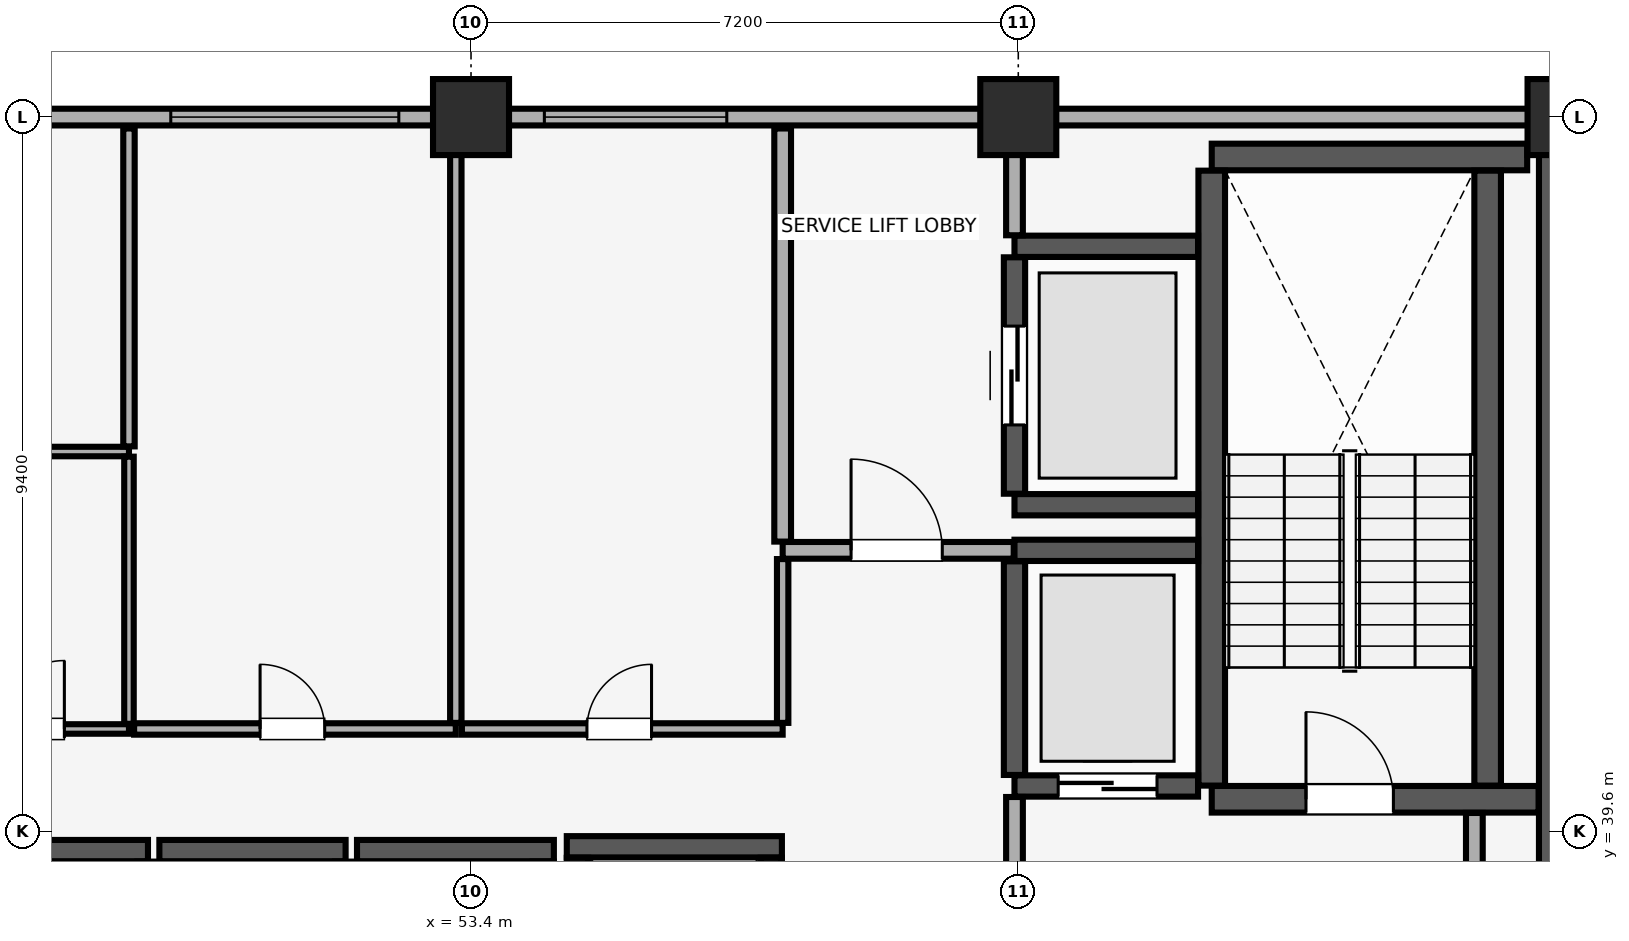
"""IFC4 building model, lengths in metres.
Left out: names, types, materials, properties, quantities, classifications, styles, units other than length and angle.
Written with IfcOpenShell. Run it as: python <this file> out.ifc"""

import sys

from ifc_helpers import new_model, si_unit, direction, frame, frame_2d, origin, origin_2d, place, context, subcontext, project, spatial, rectangle, extrude, element, fill, save


model = new_model("IFC4")
c1 = context("Model", 3, precision=1e-05, world=origin(), true_north=direction((0.0, 1.0)))
c2 = subcontext(c1, "Body", "Model", "MODEL_VIEW")
j1 = project(units=[si_unit("LENGTHUNIT", "METRE"), si_unit("PLANEANGLEUNIT", "RADIAN")], contexts=[c1])
p1 = place(None, origin())
s1 = spatial("IfcSite", under=j1, at=p1, CompositionType="ELEMENT")
p2 = place(p1, origin())
s2 = spatial("IfcBuilding", under=s1, at=p2, CompositionType="ELEMENT")
p3 = place(p2, frame((0.0, 0.0, 229.15)))
s3 = spatial("IfcBuildingStorey", under=s2, at=p3, CompositionType="ELEMENT", Elevation=229.15)
for number, where, z_axis, x_axis in (
    (1, (53.4, 49.0, 0.0), (0.0, 0.0, 1.0), (1.0, 0.0, 0.0)),
    (2, (60.6, 49.0, 0.0), (0.0, 0.0, 1.0), (1.0, 0.0, 0.0)),
    (3, (67.8, 49.0, 0.0), (0.0, 0.0, 1.0), (1.0, 0.0, 0.0)),
):
    element("IfcColumn", number, at=place(p3, frame(where, z_axis=z_axis, x_axis=x_axis)), inside=s3, PredefinedType="COLUMN", context=c2, shape_type="SweptSolid", body=[
        extrude(rectangle(XDim=1.0, YDim=1.0, at=origin_2d()), origin(), (0.0, 0.0, 1.0), 3.71),
    ])
p4 = place(p3, frame((74.2, 49.0, 0.0), z_axis=(0.0, 0.0, 1.0), x_axis=(-1.0, 0.0, 0.0)))
e4 = element("IfcWall", 4, at=p4, inside=s3, PredefinedType="SOLIDWALL", context=c2, shape_type="SweptSolid", body=[
    extrude(rectangle(XDim=64.4, YDim=0.22, at=frame_2d((32.2, 0.0))), origin(), (0.0, 0.0, 1.0), 2.91),
])
p5 = place(p4, frame((59.815, 0.0, 0.85)))
e5 = element("IfcOpeningElement", 5, at=p5, cuts=e4, PredefinedType="OPENING", context=c2, shape_type="SweptSolid", body=[
    extrude(rectangle(XDim=3.0, YDim=1.5, at=frame_2d((1.5, 0.75))), frame((0.0, 0.12, 0.0), z_axis=(0.0, -1.0, 0.0), x_axis=(1.0, 0.0, 0.0)), (0.0, 0.0, 1.0), 0.24),
])
p6 = place(p4, frame((1.585, 0.0, 0.85)))
e6 = element("IfcOpeningElement", 6, at=p6, cuts=e4, PredefinedType="OPENING", context=c2, shape_type="SweptSolid", body=[
    extrude(rectangle(XDim=3.0, YDim=1.5, at=frame_2d((1.5, 0.75))), frame((0.0, 0.12, 0.0), z_axis=(0.0, -1.0, 0.0), x_axis=(1.0, 0.0, 0.0)), (0.0, 0.0, 1.0), 0.24),
])
p7 = place(p4, frame((44.715, 0.0, 0.9)))
e7 = element("IfcOpeningElement", 7, at=p7, cuts=e4, PredefinedType="OPENING", context=c2, shape_type="SweptSolid", body=[
    extrude(rectangle(XDim=3.6, YDim=1.5, at=frame_2d((1.8, 0.75))), frame((0.0, 0.12, 0.0), z_axis=(0.0, -1.0, 0.0), x_axis=(1.0, 0.0, 0.0)), (0.0, 0.0, 1.0), 0.24),
])
p8 = place(p4, frame((38.5, 0.0, 0.9)))
e8 = element("IfcOpeningElement", 8, at=p8, cuts=e4, PredefinedType="OPENING", context=c2, shape_type="SweptSolid", body=[
    extrude(rectangle(XDim=2.4, YDim=1.5, at=frame_2d((1.2, 0.75))), frame((0.0, 0.12, 0.0), z_axis=(0.0, -1.0, 0.0), x_axis=(1.0, 0.0, 0.0)), (0.0, 0.0, 1.0), 0.24),
])
p9 = place(p4, frame((21.75, 0.0, 0.9)))
e9 = element("IfcOpeningElement", 9, at=p9, cuts=e4, PredefinedType="OPENING", context=c2, shape_type="SweptSolid", body=[
    extrude(rectangle(XDim=3.0, YDim=1.5, at=frame_2d((1.5, 0.75))), frame((0.0, 0.12, 0.0), z_axis=(0.0, -1.0, 0.0), x_axis=(1.0, 0.0, 0.0)), (0.0, 0.0, 1.0), 0.24),
])
p10 = place(p4, frame((17.435, 0.0, 0.9)))
e10 = element("IfcOpeningElement", 10, at=p10, cuts=e4, PredefinedType="OPENING", context=c2, shape_type="SweptSolid", body=[
    extrude(rectangle(XDim=2.4, YDim=1.5, at=frame_2d((1.2, 0.75))), frame((0.0, 0.12, 0.0), z_axis=(0.0, -1.0, 0.0), x_axis=(1.0, 0.0, 0.0)), (0.0, 0.0, 1.0), 0.24),
])
p11 = place(p3, frame((67.8, 29.4, 0.0), z_axis=(0.0, 0.0, 1.0), x_axis=(0.0, 1.0, 0.0)))
e11 = element("IfcWall", 11, at=p11, inside=s3, PredefinedType="SHEAR", context=c2, shape_type="SweptSolid", body=[
    extrude(rectangle(XDim=19.2, YDim=0.7, at=frame_2d((9.6, 0.0))), origin(), (0.0, 0.0, 1.0), 3.71),
])
p12 = place(p3, frame((63.145, 40.025, 0.0), z_axis=(0.0, 0.0, 1.0), x_axis=(1.0, 0.0, 0.0)))
e12 = element("IfcWall", 12, at=p12, inside=s3, PredefinedType="SHEAR", context=c2, shape_type="SweptSolid", body=[
    extrude(rectangle(XDim=4.3, YDim=0.35, at=frame_2d((2.15, 0.0))), origin(), (0.0, 0.0, 1.0), 3.71),
])
p13 = place(p12, frame((1.24, 0.0, 0.0)))
e13 = element("IfcOpeningElement", 13, at=p13, cuts=e12, PredefinedType="OPENING", context=c2, shape_type="SweptSolid", body=[
    extrude(rectangle(XDim=1.15, YDim=2.15, at=frame_2d((0.575, 1.075))), frame((0.0, 0.185, 0.0), z_axis=(0.0, -1.0, 0.0), x_axis=(1.0, 0.0, 0.0)), (0.0, 0.0, 1.0), 0.37),
])
p14 = place(p3, frame((63.145, 48.475, 0.0), z_axis=(0.0, 0.0, 1.0), x_axis=(1.0, 0.0, 0.0)))
e14 = element("IfcWall", 14, at=p14, inside=s3, PredefinedType="SHEAR", context=c2, shape_type="SweptSolid", body=[
    extrude(rectangle(XDim=4.15, YDim=0.35, at=frame_2d((2.075, 0.0))), origin(), (0.0, 0.0, 1.0), 3.71),
])
for number, where, z_axis, x_axis in (
    (15, (63.145, 40.205, 0.0), (0.0, 0.0, 1.0), (0.0, 1.0, 0.0)),
    (16, (66.775, 40.205, 0.0), (0.0, 0.0, 1.0), (0.0, 1.0, 0.0)),
):
    element("IfcWall", number, at=place(p3, frame(where, z_axis=z_axis, x_axis=x_axis)), inside=s3, PredefinedType="SHEAR", context=c2, shape_type="SweptSolid", body=[
        extrude(rectangle(XDim=8.09, YDim=0.35, at=frame_2d((4.045, 0.0))), origin(), (0.0, 0.0, 1.0), 3.71),
    ])
p15 = place(p3, frame((46.7, 39.35, 0.0), z_axis=(0.0, 0.0, 1.0), x_axis=(1.0, 0.0, 0.0)))
e17 = element("IfcWall", 17, at=p15, inside=s3, PredefinedType="SHEAR", context=c2, shape_type="SweptSolid", body=[
    extrude(rectangle(XDim=2.45, YDim=0.28, at=frame_2d((1.225, 0.0))), origin(), (0.0, 0.0, 1.0), 3.71),
])
p16 = place(p3, frame((49.15, 37.145, 0.0), z_axis=(0.0, 0.0, 1.0), x_axis=(0.0, 1.0, 0.0)))
e18 = element("IfcWall", 18, at=p16, inside=s3, PredefinedType="SHEAR", context=c2, shape_type="SweptSolid", body=[
    extrude(rectangle(XDim=2.06, YDim=0.28, at=frame_2d((1.03, 0.0))), origin(), (0.0, 0.0, 1.0), 3.71),
])
p17 = place(p3, frame((49.3, 39.35, 0.0), z_axis=(0.0, 0.0, 1.0), x_axis=(1.0, 0.0, 0.0)))
e19 = element("IfcWall", 19, at=p17, inside=s3, PredefinedType="SHEAR", context=c2, shape_type="SweptSolid", body=[
    extrude(rectangle(XDim=2.45, YDim=0.28, at=frame_2d((1.225, 0.0))), origin(), (0.0, 0.0, 1.0), 3.71),
])
p18 = place(p3, frame((51.75, 37.145, 0.0), z_axis=(0.0, 0.0, 1.0), x_axis=(0.0, 1.0, 0.0)))
e20 = element("IfcWall", 20, at=p18, inside=s3, PredefinedType="SHEAR", context=c2, shape_type="SweptSolid", body=[
    extrude(rectangle(XDim=2.06, YDim=0.28, at=frame_2d((1.03, 0.0))), origin(), (0.0, 0.0, 1.0), 3.71),
])
p19 = place(p3, frame((51.9, 39.35, 0.0), z_axis=(0.0, 0.0, 1.0), x_axis=(1.0, 0.0, 0.0)))
e21 = element("IfcWall", 21, at=p19, inside=s3, PredefinedType="SHEAR", context=c2, shape_type="SweptSolid", body=[
    extrude(rectangle(XDim=2.59, YDim=0.28, at=frame_2d((1.295, 0.0))), origin(), (0.0, 0.0, 1.0), 3.71),
])
p20 = place(p3, frame((54.35, 37.145, 0.0), z_axis=(0.0, 0.0, 1.0), x_axis=(0.0, 1.0, 0.0)))
e22 = element("IfcWall", 22, at=p20, inside=s3, PredefinedType="SHEAR", context=c2, shape_type="SweptSolid", body=[
    extrude(rectangle(XDim=2.06, YDim=0.28, at=frame_2d((1.03, 0.0))), origin(), (0.0, 0.0, 1.0), 3.71),
])
p21 = place(p3, frame((54.66, 39.4, 0.0), z_axis=(0.0, 0.0, 1.0), x_axis=(1.0, 0.0, 0.0)))
e23 = element("IfcWall", 23, at=p21, inside=s3, PredefinedType="SHEAR", context=c2, shape_type="SweptSolid", body=[
    extrude(rectangle(XDim=2.83, YDim=0.28, at=frame_2d((1.415, 0.0))), origin(), (0.0, 0.0, 1.0), 3.71),
])
for number, where, z_axis, x_axis in (
    (24, (54.8, 37.145, 0.0), (0.0, 0.0, 1.0), (0.0, 1.0, 0.0)),
    (25, (57.35, 37.145, 0.0), (0.0, 0.0, 1.0), (0.0, 1.0, 0.0)),
):
    element("IfcWall", number, at=place(p3, frame(where, z_axis=z_axis, x_axis=x_axis)), inside=s3, PredefinedType="SHEAR", context=c2, shape_type="SweptSolid", body=[
        extrude(rectangle(XDim=2.11, YDim=0.28, at=frame_2d((1.055, 0.0))), origin(), (0.0, 0.0, 1.0), 3.71),
    ])
p22 = place(p3, frame((60.55, 40.2, 0.0), z_axis=(0.0, 0.0, 1.0), x_axis=(1.0, 0.0, 0.0)))
e26 = element("IfcWall", 26, at=p22, inside=s3, PredefinedType="SHEAR", context=c2, shape_type="SweptSolid", body=[
    extrude(rectangle(XDim=2.415, YDim=0.28, at=frame_2d((1.208, 0.0))), origin(), (0.0, 0.0, 1.0), 3.71),
])
p23 = place(p22, frame((0.575, 0.0, 0.0)))
e27 = element("IfcOpeningElement", 27, at=p23, cuts=e26, PredefinedType="OPENING", context=c2, shape_type="SweptSolid", body=[
    extrude(rectangle(XDim=1.3, YDim=2.3, at=frame_2d((0.65, 1.15))), frame((0.0, 0.15, 0.0), z_axis=(0.0, -1.0, 0.0), x_axis=(1.0, 0.0, 0.0)), (0.0, 0.0, 1.0), 0.3),
])
p24 = place(p3, frame((60.55, 43.3, 0.0), z_axis=(0.0, 0.0, 1.0), x_axis=(1.0, 0.0, 0.0)))
e28 = element("IfcWall", 28, at=p24, inside=s3, PredefinedType="SHEAR", context=c2, shape_type="SweptSolid", body=[
    extrude(rectangle(XDim=2.415, YDim=0.28, at=frame_2d((1.208, 0.0))), origin(), (0.0, 0.0, 1.0), 3.71),
])
p25 = place(p3, frame((60.55, 40.345, 0.0), z_axis=(0.0, 0.0, 1.0), x_axis=(0.0, 1.0, 0.0)))
e29 = element("IfcWall", 29, at=p25, inside=s3, PredefinedType="SHEAR", context=c2, shape_type="SweptSolid", body=[
    extrude(rectangle(XDim=2.81, YDim=0.28, at=frame_2d((1.405, 0.0))), origin(), (0.0, 0.0, 1.0), 3.71),
])
for number, where, z_axis, x_axis in (
    (30, (60.55, 43.9, 0.0), (0.0, 0.0, 1.0), (1.0, 0.0, 0.0)),
    (31, (60.55, 47.3, 0.0), (0.0, 0.0, 1.0), (1.0, 0.0, 0.0)),
):
    element("IfcWall", number, at=place(p3, frame(where, z_axis=z_axis, x_axis=x_axis)), inside=s3, PredefinedType="SHEAR", context=c2, shape_type="SweptSolid", body=[
        extrude(rectangle(XDim=2.415, YDim=0.28, at=frame_2d((1.208, 0.0))), origin(), (0.0, 0.0, 1.0), 3.71),
    ])
p26 = place(p3, frame((60.55, 44.045, 0.0), z_axis=(0.0, 0.0, 1.0), x_axis=(0.0, 1.0, 0.0)))
e32 = element("IfcWall", 32, at=p26, inside=s3, PredefinedType="SHEAR", context=c2, shape_type="SweptSolid", body=[
    extrude(rectangle(XDim=3.11, YDim=0.28, at=frame_2d((1.555, 0.0))), origin(), (0.0, 0.0, 1.0), 3.71),
])
p27 = place(p26, frame((0.905, 0.0, 0.0)))
e33 = element("IfcOpeningElement", 33, at=p27, cuts=e32, PredefinedType="OPENING", context=c2, shape_type="SweptSolid", body=[
    extrude(rectangle(XDim=1.3, YDim=2.3, at=frame_2d((0.65, 1.15))), frame((0.0, 0.15, 0.0), z_axis=(0.0, -1.0, 0.0), x_axis=(1.0, 0.0, 0.0)), (0.0, 0.0, 1.0), 0.3),
])
p28 = place(p3, frame((60.55, 34.415, 0.0), z_axis=(0.0, 0.0, 1.0), x_axis=(0.0, 1.0, 0.0)))
e34 = element("IfcWall", 34, at=p28, inside=s3, PredefinedType="PARTITIONING", context=c2, shape_type="SweptSolid", body=[
    extrude(rectangle(XDim=5.64, YDim=0.22, at=frame_2d((2.82, 0.0))), origin(), (0.0, 0.0, 1.0), 3.71),
])
p29 = place(p3, frame((66.6, 34.415, 0.0), z_axis=(0.0, 0.0, 1.0), x_axis=(0.0, 1.0, 0.0)))
e35 = element("IfcWall", 35, at=p29, inside=s3, PredefinedType="PARTITIONING", context=c2, shape_type="SweptSolid", body=[
    extrude(rectangle(XDim=5.43, YDim=0.22, at=frame_2d((2.715, 0.0))), origin(), (0.0, 0.0, 1.0), 3.71),
])
p30 = place(p3, frame((57.5, 43.3, 0.0), z_axis=(0.0, 0.0, 1.0), x_axis=(1.0, 0.0, 0.0)))
e36 = element("IfcWall", 36, at=p30, inside=s3, PredefinedType="PARTITIONING", context=c2, shape_type="SweptSolid", body=[
    extrude(rectangle(XDim=3.04, YDim=0.22, at=frame_2d((1.52, 0.0))), origin(), (0.0, 0.0, 1.0), 3.71),
])
p31 = place(p30, frame((0.9, 0.0, 0.0)))
e37 = element("IfcOpeningElement", 37, at=p31, cuts=e36, PredefinedType="OPENING", context=c2, shape_type="SweptSolid", body=[
    extrude(rectangle(XDim=1.2, YDim=2.15, at=frame_2d((0.6, 1.075))), frame((0.0, 0.12, 0.0), z_axis=(0.0, -1.0, 0.0), x_axis=(1.0, 0.0, 0.0)), (0.0, 0.0, 1.0), 0.24),
])
p32 = place(p3, frame((57.5, 43.415, 0.0), z_axis=(0.0, 0.0, 1.0), x_axis=(0.0, 1.0, 0.0)))
e38 = element("IfcWall", 38, at=p32, inside=s3, PredefinedType="PARTITIONING", context=c2, shape_type="SweptSolid", body=[
    extrude(rectangle(XDim=5.435, YDim=0.22, at=frame_2d((2.718, 0.0))), origin(), (0.0, 0.0, 1.0), 3.71),
])
p33 = place(p3, frame((60.55, 47.445, 0.0), z_axis=(0.0, 0.0, 1.0), x_axis=(0.0, 1.0, 0.0)))
e39 = element("IfcWall", 39, at=p33, inside=s3, PredefinedType="PARTITIONING", context=c2, shape_type="SweptSolid", body=[
    extrude(rectangle(XDim=1.405, YDim=0.22, at=frame_2d((0.703, 0.0))), origin(), (0.0, 0.0, 1.0), 3.71),
])
p34 = place(p3, frame((44.3, 40.95, 0.0), z_axis=(0.0, 0.0, 1.0), x_axis=(1.0, 0.0, 0.0)))
e40 = element("IfcWall", 40, at=p34, inside=s3, PredefinedType="PARTITIONING", context=c2, shape_type="SweptSolid", body=[
    extrude(rectangle(XDim=4.6, YDim=0.125, at=frame_2d((2.3, 0.0))), origin(), (0.0, 0.0, 1.0), 3.71),
])
p35 = place(p34, frame((2.85, 0.0, 0.0)))
e41 = element("IfcOpeningElement", 41, at=p35, cuts=e40, PredefinedType="OPENING", context=c2, shape_type="SweptSolid", body=[
    extrude(rectangle(XDim=0.9, YDim=2.1, at=frame_2d((0.45, 1.05))), frame((0.0, 0.073, 0.0), z_axis=(0.0, -1.0, 0.0), x_axis=(1.0, 0.0, 0.0)), (0.0, 0.0, 1.0), 0.145),
])
p36 = place(p3, frame((44.3, 44.6, 0.0), z_axis=(0.0, 0.0, 1.0), x_axis=(1.0, 0.0, 0.0)))
e42 = element("IfcWall", 42, at=p36, inside=s3, PredefinedType="PARTITIONING", context=c2, shape_type="SweptSolid", body=[
    extrude(rectangle(XDim=4.6, YDim=0.125, at=frame_2d((2.3, 0.0))), origin(), (0.0, 0.0, 1.0), 3.71),
])
p37 = place(p3, frame((48.9, 41.018, 0.0), z_axis=(0.0, 0.0, 1.0), x_axis=(0.0, 1.0, 0.0)))
e43 = element("IfcWall", 43, at=p37, inside=s3, PredefinedType="PARTITIONING", context=c2, shape_type="SweptSolid", body=[
    extrude(rectangle(XDim=3.515, YDim=0.125, at=frame_2d((1.757, 0.0))), origin(), (0.0, 0.0, 1.0), 3.71),
])
p38 = place(p3, frame((48.968, 40.95, 0.0), z_axis=(0.0, 0.0, 1.0), x_axis=(1.0, 0.0, 0.0)))
e44 = element("IfcWall", 44, at=p38, inside=s3, PredefinedType="PARTITIONING", context=c2, shape_type="SweptSolid", body=[
    extrude(rectangle(XDim=4.232, YDim=0.15, at=frame_2d((2.116, 0.0))), origin(), (0.0, 0.0, 1.0), 3.71),
])
p39 = place(p38, frame((1.657, 0.0, 0.0)))
e45 = element("IfcOpeningElement", 45, at=p39, cuts=e44, PredefinedType="OPENING", context=c2, shape_type="SweptSolid", body=[
    extrude(rectangle(XDim=0.85, YDim=2.1, at=frame_2d((0.425, 1.05))), frame((0.0, 0.085, 0.0), z_axis=(0.0, -1.0, 0.0), x_axis=(1.0, 0.0, 0.0)), (0.0, 0.0, 1.0), 0.17),
])
p40 = place(p3, frame((48.9, 44.667, 0.0), z_axis=(0.0, 0.0, 1.0), x_axis=(0.0, 1.0, 0.0)))
e46 = element("IfcWall", 46, at=p40, inside=s3, PredefinedType="PARTITIONING", context=c2, shape_type="SweptSolid", body=[
    extrude(rectangle(XDim=4.183, YDim=0.15, at=frame_2d((2.091, 0.0))), origin(), (0.0, 0.0, 1.0), 3.71),
])
p41 = place(p3, frame((53.2, 41.03, 0.0), z_axis=(0.0, 0.0, 1.0), x_axis=(0.0, 1.0, 0.0)))
e47 = element("IfcWall", 47, at=p41, inside=s3, PredefinedType="PARTITIONING", context=c2, shape_type="SweptSolid", body=[
    extrude(rectangle(XDim=7.82, YDim=0.15, at=frame_2d((3.91, 0.0))), origin(), (0.0, 0.0, 1.0), 3.71),
])
p42 = place(p3, frame((53.28, 40.95, 0.0), z_axis=(0.0, 0.0, 1.0), x_axis=(1.0, 0.0, 0.0)))
e48 = element("IfcWall", 48, at=p42, inside=s3, PredefinedType="PARTITIONING", context=c2, shape_type="SweptSolid", body=[
    extrude(rectangle(XDim=4.22, YDim=0.15, at=frame_2d((2.11, 0.0))), origin(), (0.0, 0.0, 1.0), 3.71),
])
p43 = place(p42, frame((1.645, 0.0, 0.0)))
e49 = element("IfcOpeningElement", 49, at=p43, cuts=e48, PredefinedType="OPENING", context=c2, shape_type="SweptSolid", body=[
    extrude(rectangle(XDim=0.85, YDim=2.1, at=frame_2d((0.425, 1.05))), frame((0.0, 0.085, 0.0), z_axis=(0.0, -1.0, 0.0), x_axis=(1.0, 0.0, 0.0)), (0.0, 0.0, 1.0), 0.17),
])
p44 = place(p3, frame((57.5, 41.03, 0.0), z_axis=(0.0, 0.0, 1.0), x_axis=(0.0, 1.0, 0.0)))
e50 = element("IfcWall", 50, at=p44, inside=s3, PredefinedType="PARTITIONING", context=c2, shape_type="SweptSolid", body=[
    extrude(rectangle(XDim=2.155, YDim=0.15, at=frame_2d((1.078, 0.0))), origin(), (0.0, 0.0, 1.0), 3.71),
])
p45 = place(p9, origin())
e51 = element("IfcWindow", 51, at=p45, inside=s3, PartitioningType="SINGLE_PANEL", PredefinedType="WINDOW", context=c2, shape_type="SweptSolid", body=[
    extrude(rectangle(XDim=3.0, YDim=1.5, at=frame_2d((1.5, 0.75))), frame((0.0, 0.03, 0.0), z_axis=(0.0, -1.0, 0.0), x_axis=(1.0, 0.0, 0.0)), (0.0, 0.0, 1.0), 0.06),
])
fill(e9, e51)
p46 = place(p10, origin())
e52 = element("IfcWindow", 52, at=p46, inside=s3, PartitioningType="SINGLE_PANEL", PredefinedType="WINDOW", context=c2, shape_type="SweptSolid", body=[
    extrude(rectangle(XDim=2.4, YDim=1.5, at=frame_2d((1.2, 0.75))), frame((0.0, 0.03, 0.0), z_axis=(0.0, -1.0, 0.0), x_axis=(1.0, 0.0, 0.0)), (0.0, 0.0, 1.0), 0.06),
])
fill(e10, e52)
p47 = place(p13, origin())
e53 = element("IfcDoor", 53, at=p47, inside=s3, OperationType="SINGLE_SWING_LEFT", PredefinedType="DOOR", context=c2, shape_type="SweptSolid", body=[
    extrude(rectangle(XDim=1.15, YDim=2.15, at=frame_2d((0.575, 1.075))), frame((0.0, 0.025, 0.0), z_axis=(0.0, -1.0, 0.0), x_axis=(1.0, 0.0, 0.0)), (0.0, 0.0, 1.0), 0.05),
])
fill(e13, e53)
p48 = place(p23, origin())
e54 = element("IfcDoor", 54, at=p48, inside=s3, OperationType="DOUBLE_DOOR_SLIDING", PredefinedType="DOOR", context=c2, shape_type="SweptSolid", body=[
    extrude(rectangle(XDim=1.3, YDim=2.3, at=frame_2d((0.65, 1.15))), frame((0.0, 0.025, 0.0), z_axis=(0.0, -1.0, 0.0), x_axis=(1.0, 0.0, 0.0)), (0.0, 0.0, 1.0), 0.05),
])
fill(e27, e54)
p49 = place(p27, origin())
e55 = element("IfcDoor", 55, at=p49, inside=s3, OperationType="DOUBLE_DOOR_SLIDING", PredefinedType="DOOR", context=c2, shape_type="SweptSolid", body=[
    extrude(rectangle(XDim=1.3, YDim=2.3, at=frame_2d((0.65, 1.15))), frame((0.0, 0.025, 0.0), z_axis=(0.0, -1.0, 0.0), x_axis=(1.0, 0.0, 0.0)), (0.0, 0.0, 1.0), 0.05),
])
fill(e33, e55)
p50 = place(p31, origin())
e56 = element("IfcDoor", 56, at=p50, inside=s3, OperationType="SINGLE_SWING_LEFT", PredefinedType="DOOR", context=c2, shape_type="SweptSolid", body=[
    extrude(rectangle(XDim=1.2, YDim=2.15, at=frame_2d((0.6, 1.075))), frame((0.0, 0.025, 0.0), z_axis=(0.0, -1.0, 0.0), x_axis=(1.0, 0.0, 0.0)), (0.0, 0.0, 1.0), 0.05),
])
fill(e37, e56)
p51 = place(p35, origin())
e57 = element("IfcDoor", 57, at=p51, inside=s3, OperationType="SINGLE_SWING_RIGHT", PredefinedType="DOOR", context=c2, shape_type="SweptSolid", body=[
    extrude(rectangle(XDim=0.9, YDim=2.1, at=frame_2d((0.45, 1.05))), frame((0.0, 0.025, 0.0), z_axis=(0.0, -1.0, 0.0), x_axis=(1.0, 0.0, 0.0)), (0.0, 0.0, 1.0), 0.05),
])
fill(e41, e57)
p52 = place(p39, origin())
e58 = element("IfcDoor", 58, at=p52, inside=s3, OperationType="SINGLE_SWING_LEFT", PredefinedType="DOOR", context=c2, shape_type="SweptSolid", body=[
    extrude(rectangle(XDim=0.85, YDim=2.1, at=frame_2d((0.425, 1.05))), frame((0.0, 0.025, 0.0), z_axis=(0.0, -1.0, 0.0), x_axis=(1.0, 0.0, 0.0)), (0.0, 0.0, 1.0), 0.05),
])
fill(e45, e58)
p53 = place(p43, origin())
e59 = element("IfcDoor", 59, at=p53, inside=s3, OperationType="SINGLE_SWING_RIGHT", PredefinedType="DOOR", context=c2, shape_type="SweptSolid", body=[
    extrude(rectangle(XDim=0.85, YDim=2.1, at=frame_2d((0.425, 1.05))), frame((0.0, 0.025, 0.0), z_axis=(0.0, -1.0, 0.0), x_axis=(1.0, 0.0, 0.0)), (0.0, 0.0, 1.0), 0.05),
])
fill(e49, e59)
save(model, sys.argv[1])
